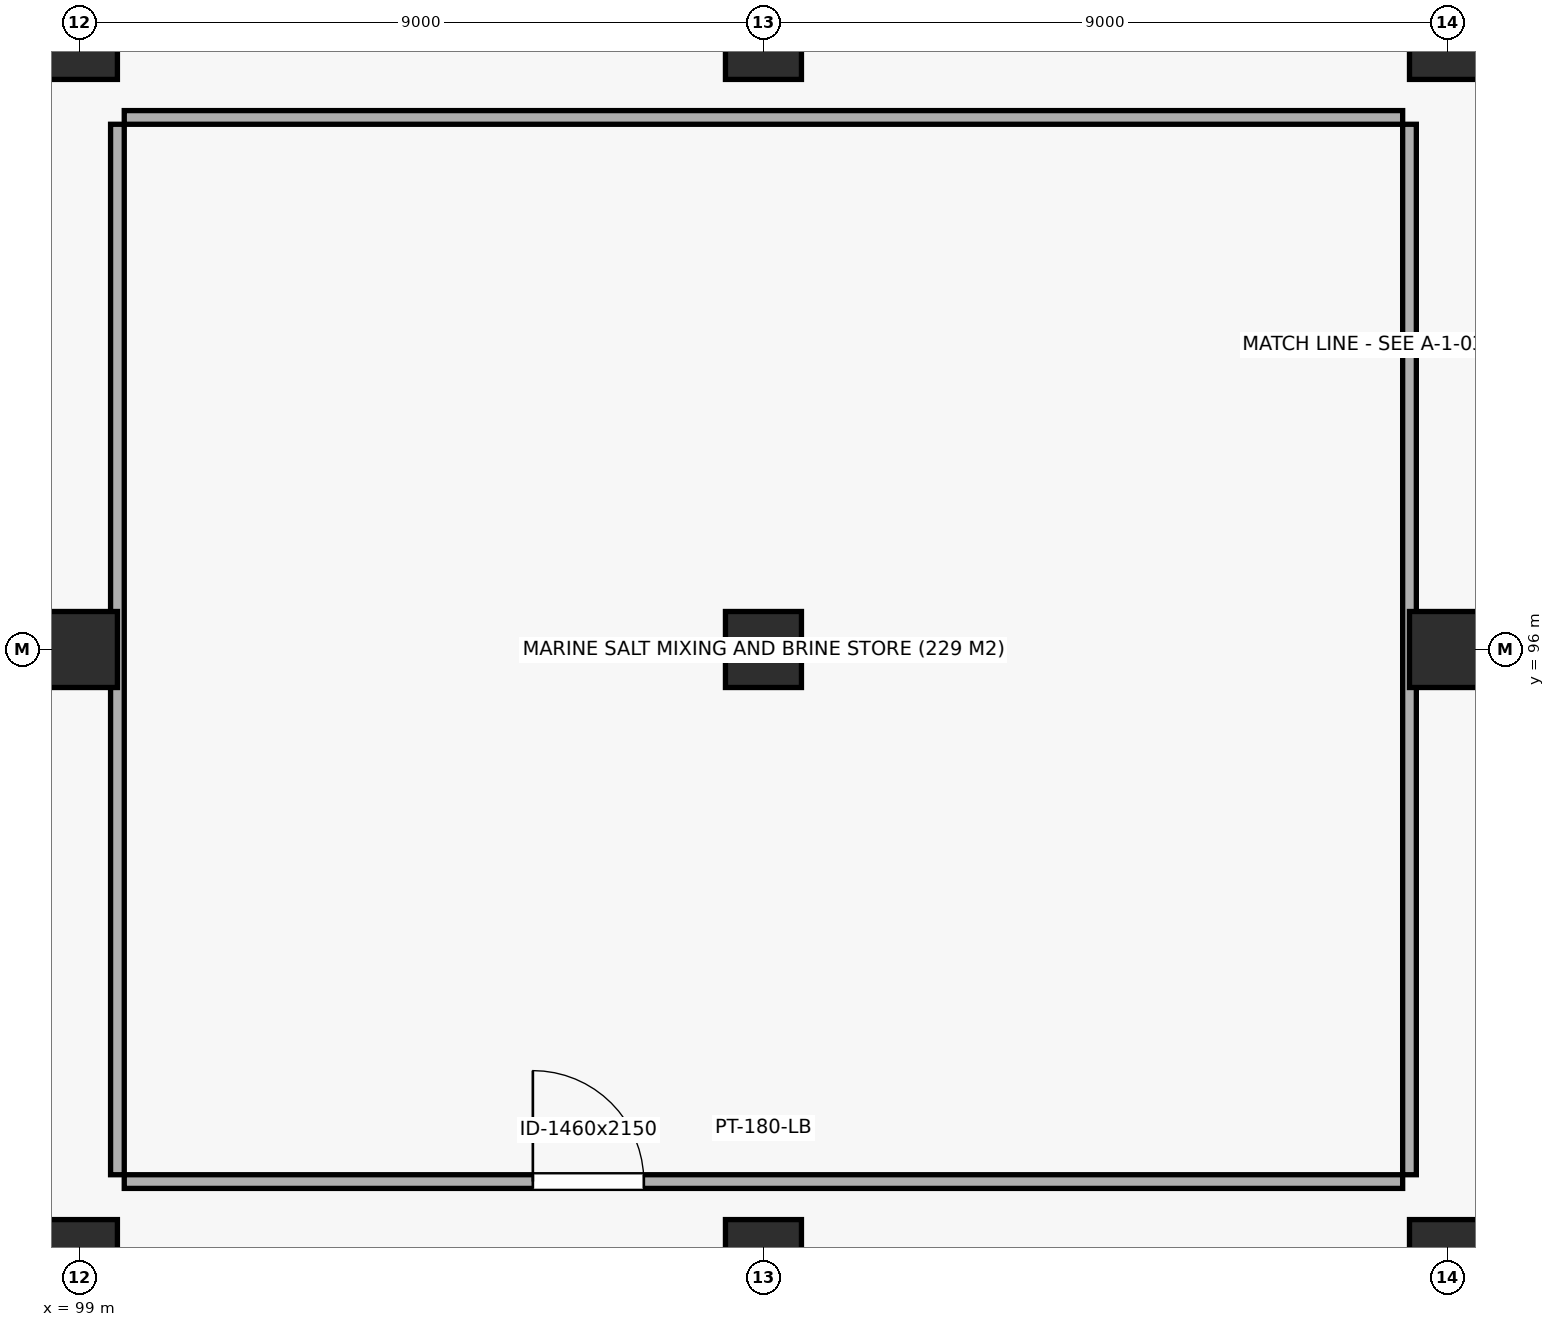
"""IFC4 building model, lengths in metres.
Left out: names, types, materials, properties, quantities, classifications, styles, units other than length and angle.
Written with IfcOpenShell. Run it as: python <this file> out.ifc"""

import sys

from ifc_helpers import new_model, si_unit, direction, frame, frame_2d, origin, origin_2d, place, context, subcontext, project, spatial, rectangle, extrude, element, fill, save


model = new_model("IFC4")
c1 = context("Model", 3, precision=1e-05, world=origin(), true_north=direction((0.0, 1.0)))
c2 = subcontext(c1, "Body", "Model", "MODEL_VIEW")
j1 = project(units=[si_unit("LENGTHUNIT", "METRE"), si_unit("PLANEANGLEUNIT", "RADIAN")], contexts=[c1])
p1 = place(None, origin())
s1 = spatial("IfcSite", under=j1, at=p1, CompositionType="ELEMENT")
p2 = place(p1, origin())
s2 = spatial("IfcBuilding", under=s1, at=p2, CompositionType="ELEMENT")
p3 = place(p2, frame((0.0, 0.0, -9.0)))
s3 = spatial("IfcBuildingStorey", under=s2, at=p3, CompositionType="ELEMENT", Elevation=-9.0)
for number, where, z_axis, x_axis in (
    (1, (99.0, 88.0, 0.0), (0.0, 0.0, 1.0), (1.0, 0.0, 0.0)),
    (2, (99.0, 96.0, 0.0), (0.0, 0.0, 1.0), (1.0, 0.0, 0.0)),
    (3, (99.0, 104.0, 0.0), (0.0, 0.0, 1.0), (1.0, 0.0, 0.0)),
    (4, (108.0, 88.0, 0.0), (0.0, 0.0, 1.0), (1.0, 0.0, 0.0)),
    (5, (108.0, 96.0, 0.0), (0.0, 0.0, 1.0), (1.0, 0.0, 0.0)),
    (6, (108.0, 104.0, 0.0), (0.0, 0.0, 1.0), (1.0, 0.0, 0.0)),
    (7, (117.0, 88.0, 0.0), (0.0, 0.0, 1.0), (1.0, 0.0, 0.0)),
    (8, (117.0, 96.0, 0.0), (0.0, 0.0, 1.0), (1.0, 0.0, 0.0)),
    (9, (117.0, 104.0, 0.0), (0.0, 0.0, 1.0), (1.0, 0.0, 0.0)),
):
    element("IfcColumn", number, at=place(p3, frame(where, z_axis=z_axis, x_axis=x_axis)), inside=s3, PredefinedType="COLUMN", context=c2, shape_type="SweptSolid", body=[
        extrude(rectangle(XDim=1.0, YDim=1.0, at=origin_2d()), origin(), (0.0, 0.0, 1.0), 4.5),
    ])
p4 = place(p3, frame((99.59, 89.0, 0.0), z_axis=(0.0, 0.0, 1.0), x_axis=(1.0, 0.0, 0.0)))
e10 = element("IfcWall", 10, at=p4, inside=s3, PredefinedType="PARTITIONING", context=c2, shape_type="SweptSolid", body=[
    extrude(rectangle(XDim=16.82, YDim=0.18, at=frame_2d((8.41, 0.0))), origin(), (0.0, 0.0, 1.0), 4.2),
])
p5 = place(p4, frame((5.376, 0.0, 0.0)))
e11 = element("IfcOpeningElement", 11, at=p5, cuts=e10, PredefinedType="OPENING", context=c2, shape_type="SweptSolid", body=[
    extrude(rectangle(XDim=1.46, YDim=2.15, at=frame_2d((0.73, 1.075))), frame((0.0, 0.102, 0.0), z_axis=(0.0, -1.0, 0.0), x_axis=(1.0, 0.0, 0.0)), (0.0, 0.0, 1.0), 0.204),
])
p6 = place(p3, frame((99.59, 103.0, 0.0), z_axis=(0.0, 0.0, 1.0), x_axis=(1.0, 0.0, 0.0)))
e12 = element("IfcWall", 12, at=p6, inside=s3, PredefinedType="PARTITIONING", context=c2, shape_type="SweptSolid", body=[
    extrude(rectangle(XDim=16.82, YDim=0.18, at=frame_2d((8.41, 0.0))), origin(), (0.0, 0.0, 1.0), 4.2),
])
for number, where, z_axis, x_axis in (
    (13, (99.5, 89.09, 0.0), (0.0, 0.0, 1.0), (0.0, 1.0, 0.0)),
    (14, (116.5, 89.09, 0.0), (0.0, 0.0, 1.0), (0.0, 1.0, 0.0)),
):
    element("IfcWall", number, at=place(p3, frame(where, z_axis=z_axis, x_axis=x_axis)), inside=s3, PredefinedType="PARTITIONING", context=c2, shape_type="SweptSolid", body=[
        extrude(rectangle(XDim=13.82, YDim=0.18, at=frame_2d((6.91, 0.0))), origin(), (0.0, 0.0, 1.0), 4.2),
    ])
p7 = place(p5, origin())
e15 = element("IfcDoor", 15, at=p7, inside=s3, OperationType="SINGLE_SWING_LEFT", PredefinedType="DOOR", context=c2, shape_type="SweptSolid", body=[
    extrude(rectangle(XDim=1.46, YDim=2.15, at=frame_2d((0.73, 1.075))), frame((0.0, 0.025, 0.0), z_axis=(0.0, -1.0, 0.0), x_axis=(1.0, 0.0, 0.0)), (0.0, 0.0, 1.0), 0.05),
])
fill(e11, e15)
save(model, sys.argv[1])
